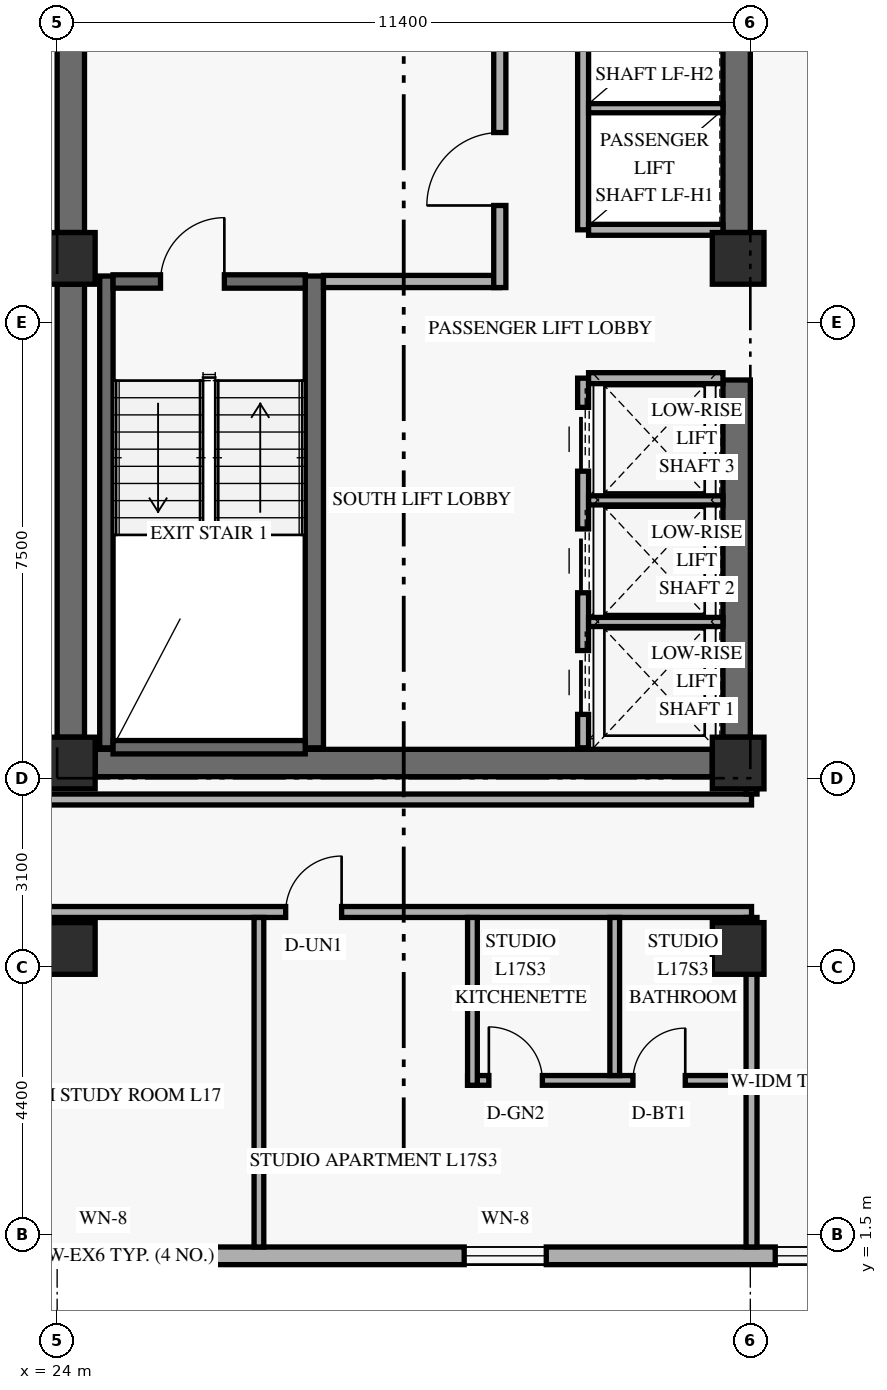
"""IFC4 building model, lengths in metres.
Left out: names, types, materials, properties, quantities, classifications, styles, units other than length and angle.
Written with IfcOpenShell. Run it as: python <this file> out.ifc"""

import sys

from ifc_helpers import new_model, si_unit, direction, frame, frame_2d, origin, origin_2d, place, context, subcontext, project, spatial, rectangle, extrude, element, fill, save


model = new_model("IFC4")
c1 = context("Model", 3, precision=1e-05, world=origin(), true_north=direction((0.0, 1.0)))
c2 = subcontext(c1, "Body", "Model", "MODEL_VIEW")
j1 = project(units=[si_unit("LENGTHUNIT", "METRE"), si_unit("PLANEANGLEUNIT", "RADIAN")], contexts=[c1])
p1 = place(None, origin())
s1 = spatial("IfcSite", under=j1, at=p1, CompositionType="ELEMENT")
p2 = place(p1, origin())
s2 = spatial("IfcBuilding", under=s1, at=p2, CompositionType="ELEMENT")
p3 = place(p2, frame((0.0, 0.0, 67.8)))
s3 = spatial("IfcBuildingStorey", under=s2, at=p3, CompositionType="ELEMENT", Elevation=67.8)
p4 = place(p3, frame((24.225, 9.675, 0.0), z_axis=(0.0, 0.0, 1.0), x_axis=(0.0, 1.0, 0.0)))
e1 = element("IfcWall", 1, at=p4, inside=s3, PredefinedType="SHEAR", context=c2, shape_type="SweptSolid", body=[
    extrude(rectangle(XDim=7.45, YDim=0.45, at=frame_2d((3.725, 0.0))), origin(), (0.0, 0.0, 1.0), 2.607),
])
p5 = place(p3, frame((24.225, 17.975, 0.0), z_axis=(0.0, 0.0, 1.0), x_axis=(0.0, 1.0, 0.0)))
e2 = element("IfcWall", 2, at=p5, inside=s3, PredefinedType="SHEAR", context=c2, shape_type="SweptSolid", body=[
    extrude(rectangle(XDim=11.8, YDim=0.45, at=frame_2d((5.9, 0.0))), origin(), (0.0, 0.0, 1.0), 2.607),
])
p6 = place(p3, frame((35.175, 9.675, 0.0), z_axis=(0.0, 0.0, 1.0), x_axis=(0.0, 1.0, 0.0)))
e3 = element("IfcWall", 3, at=p6, inside=s3, PredefinedType="SHEAR", context=c2, shape_type="SweptSolid", body=[
    extrude(rectangle(XDim=5.875, YDim=0.45, at=frame_2d((2.938, 0.0))), origin(), (0.0, 0.0, 1.0), 2.607),
])
p7 = place(p3, frame((35.175, 17.975, 0.0), z_axis=(0.0, 0.0, 1.0), x_axis=(0.0, 1.0, 0.0)))
e4 = element("IfcWall", 4, at=p7, inside=s3, PredefinedType="SHEAR", context=c2, shape_type="SweptSolid", body=[
    extrude(rectangle(XDim=10.125, YDim=0.45, at=frame_2d((5.062, 0.0))), origin(), (0.0, 0.0, 1.0), 2.607),
])
p8 = place(p3, frame((24.625, 9.25, 0.0), z_axis=(0.0, 0.0, 1.0), x_axis=(1.0, 0.0, 0.0)))
e5 = element("IfcWall", 5, at=p8, inside=s3, PredefinedType="SHEAR", context=c2, shape_type="SweptSolid", body=[
    extrude(rectangle(XDim=10.15, YDim=0.45, at=frame_2d((5.075, 0.0))), origin(), (0.0, 0.0, 1.0), 3.3),
])
p9 = place(p3, frame((24.81, 9.5, 0.0), z_axis=(0.0, 0.0, 1.0), x_axis=(0.0, 1.0, 0.0)))
e6 = element("IfcWall", 6, at=p9, inside=s3, PredefinedType="SHEAR", context=c2, shape_type="SweptSolid", body=[
    extrude(rectangle(XDim=7.76, YDim=0.22, at=frame_2d((3.88, 0.0))), origin(), (0.0, 0.0, 1.0), 3.3),
])
p10 = place(p3, frame((28.23, 9.5, 0.0), z_axis=(0.0, 0.0, 1.0), x_axis=(0.0, 1.0, 0.0)))
e7 = element("IfcWall", 7, at=p10, inside=s3, PredefinedType="SHEAR", context=c2, shape_type="SweptSolid", body=[
    extrude(rectangle(XDim=7.76, YDim=0.3, at=frame_2d((3.88, 0.0))), origin(), (0.0, 0.0, 1.0), 3.3),
])
p11 = place(p3, frame((24.92, 9.51, 0.0), z_axis=(0.0, 0.0, 1.0), x_axis=(1.0, 0.0, 0.0)))
e8 = element("IfcWall", 8, at=p11, inside=s3, PredefinedType="SHEAR", context=c2, shape_type="SweptSolid", body=[
    extrude(rectangle(XDim=3.16, YDim=0.22, at=frame_2d((1.58, 0.0))), origin(), (0.0, 0.0, 1.0), 3.3),
])
p12 = place(p3, frame((24.92, 17.17, 0.0), z_axis=(0.0, 0.0, 1.0), x_axis=(1.0, 0.0, 0.0)))
e9 = element("IfcWall", 9, at=p12, inside=s3, PredefinedType="SHEAR", context=c2, shape_type="SweptSolid", body=[
    extrude(rectangle(XDim=3.16, YDim=0.22, at=frame_2d((1.58, 0.0))), origin(), (0.0, 0.0, 1.0), 3.3),
])
p13 = place(p12, frame((0.78, 0.0, 0.0)))
e10 = element("IfcOpeningElement", 10, at=p13, cuts=e9, PredefinedType="OPENING", context=c2, shape_type="SweptSolid", body=[
    extrude(rectangle(XDim=1.05, YDim=2.15, at=frame_2d((0.525, 1.075))), frame((0.0, 0.12, 0.0), z_axis=(0.0, -1.0, 0.0), x_axis=(1.0, 0.0, 0.0)), (0.0, 0.0, 1.0), 0.24),
])
for number, where, z_axis, x_axis in (
    (11, (24.2, 6.2, 0.0), (0.0, 0.0, 1.0), (1.0, 0.0, 0.0)),
    (12, (24.2, 9.25, 0.0), (0.0, 0.0, 1.0), (1.0, 0.0, 0.0)),
    (13, (24.2, 17.55, 0.0), (0.0, 0.0, 1.0), (1.0, 0.0, 0.0)),
    (14, (35.2, 6.2, 0.0), (0.0, 0.0, 1.0), (1.0, 0.0, 0.0)),
    (15, (35.2, 9.25, 0.0), (0.0, 0.0, 1.0), (1.0, 0.0, 0.0)),
    (16, (35.2, 17.55, 0.0), (0.0, 0.0, 1.0), (1.0, 0.0, 0.0)),
):
    element("IfcColumn", number, at=place(p3, frame(where, z_axis=z_axis, x_axis=x_axis)), inside=s3, PredefinedType="COLUMN", context=c2, shape_type="SweptSolid", body=[
        extrude(rectangle(XDim=0.85, YDim=0.85, at=origin_2d()), origin(), (0.0, 0.0, 1.0), 3.6),
    ])
p14 = place(p3, frame((5.42, 1.145, 0.0), z_axis=(0.0, 0.0, 1.0), x_axis=(1.0, 0.0, 0.0)))
e17 = element("IfcWall", 17, at=p14, inside=s3, PredefinedType="SOLIDWALL", context=c2, shape_type="SweptSolid", body=[
    extrude(rectangle(XDim=39.56, YDim=0.29, at=frame_2d((19.78, 0.0))), origin(), (0.0, 0.0, 1.0), 3.3),
])
p15 = place(p14, frame((2.765, 0.0, 0.85)))
e18 = element("IfcOpeningElement", 18, at=p15, cuts=e17, PredefinedType="OPENING", context=c2, shape_type="SweptSolid", body=[
    extrude(rectangle(XDim=1.35, YDim=1.55, at=frame_2d((0.675, 0.775))), frame((0.0, 0.155, 0.0), z_axis=(0.0, -1.0, 0.0), x_axis=(1.0, 0.0, 0.0)), (0.0, 0.0, 1.0), 0.31),
])
p16 = place(p14, frame((7.18, 0.0, 0.85)))
e19 = element("IfcOpeningElement", 19, at=p16, cuts=e17, PredefinedType="OPENING", context=c2, shape_type="SweptSolid", body=[
    extrude(rectangle(XDim=1.2, YDim=1.5, at=frame_2d((0.6, 0.75))), frame((0.0, 0.155, 0.0), z_axis=(0.0, -1.0, 0.0), x_axis=(1.0, 0.0, 0.0)), (0.0, 0.0, 1.0), 0.31),
])
p17 = place(p14, frame((12.056, 0.0, 0.85)))
e20 = element("IfcOpeningElement", 20, at=p17, cuts=e17, PredefinedType="OPENING", context=c2, shape_type="SweptSolid", body=[
    extrude(rectangle(XDim=1.35, YDim=1.55, at=frame_2d((0.675, 0.775))), frame((0.0, 0.155, 0.0), z_axis=(0.0, -1.0, 0.0), x_axis=(1.0, 0.0, 0.0)), (0.0, 0.0, 1.0), 0.31),
])
p18 = place(p14, frame((18.665, 0.0, 0.85)))
e21 = element("IfcOpeningElement", 21, at=p18, cuts=e17, PredefinedType="OPENING", context=c2, shape_type="SweptSolid", body=[
    extrude(rectangle(XDim=1.35, YDim=1.55, at=frame_2d((0.675, 0.775))), frame((0.0, 0.155, 0.0), z_axis=(0.0, -1.0, 0.0), x_axis=(1.0, 0.0, 0.0)), (0.0, 0.0, 1.0), 0.31),
])
p19 = place(p14, frame((25.274, 0.0, 0.85)))
e22 = element("IfcOpeningElement", 22, at=p19, cuts=e17, PredefinedType="OPENING", context=c2, shape_type="SweptSolid", body=[
    extrude(rectangle(XDim=1.35, YDim=1.55, at=frame_2d((0.675, 0.775))), frame((0.0, 0.155, 0.0), z_axis=(0.0, -1.0, 0.0), x_axis=(1.0, 0.0, 0.0)), (0.0, 0.0, 1.0), 0.31),
])
p20 = place(p14, frame((30.39, 0.0, 0.85)))
e23 = element("IfcOpeningElement", 23, at=p20, cuts=e17, PredefinedType="OPENING", context=c2, shape_type="SweptSolid", body=[
    extrude(rectangle(XDim=1.35, YDim=1.55, at=frame_2d((0.675, 0.775))), frame((0.0, 0.155, 0.0), z_axis=(0.0, -1.0, 0.0), x_axis=(1.0, 0.0, 0.0)), (0.0, 0.0, 1.0), 0.31),
])
p21 = place(p14, frame((35.17, 0.0, 0.85)))
e24 = element("IfcOpeningElement", 24, at=p21, cuts=e17, PredefinedType="OPENING", context=c2, shape_type="SweptSolid", body=[
    extrude(rectangle(XDim=1.35, YDim=1.55, at=frame_2d((0.675, 0.775))), frame((0.0, 0.155, 0.0), z_axis=(0.0, -1.0, 0.0), x_axis=(1.0, 0.0, 0.0)), (0.0, 0.0, 1.0), 0.31),
])
p22 = place(p3, frame((28.38, 17.17, 0.0), z_axis=(0.0, 0.0, 1.0), x_axis=(1.0, 0.0, 0.0)))
e25 = element("IfcWall", 25, at=p22, inside=s3, PredefinedType="STANDARD", context=c2, shape_type="SweptSolid", body=[
    extrude(rectangle(XDim=2.9, YDim=0.2, at=frame_2d((1.45, 0.0))), origin(), (0.0, 0.0, 1.0), 3.3),
])
p23 = place(p3, frame((31.28, 17.07, 0.0), z_axis=(0.0, 0.0, 1.0), x_axis=(0.0, 1.0, 0.0)))
e26 = element("IfcWall", 26, at=p23, inside=s3, PredefinedType="STANDARD", context=c2, shape_type="SweptSolid", body=[
    extrude(rectangle(XDim=3.92, YDim=0.2, at=frame_2d((1.96, 0.0))), origin(), (0.0, 0.0, 1.0), 2.589),
])
p24 = place(p23, frame((1.35, 0.0, 0.0)))
e27 = element("IfcOpeningElement", 27, at=p24, cuts=e26, PredefinedType="OPENING", context=c2, shape_type="SweptSolid", body=[
    extrude(rectangle(XDim=1.2, YDim=2.15, at=frame_2d((0.6, 1.075))), frame((0.0, 0.11, 0.0), z_axis=(0.0, -1.0, 0.0), x_axis=(1.0, 0.0, 0.0)), (0.0, 0.0, 1.0), 0.22),
])
p25 = place(p3, frame((32.65, 9.5, 0.0), z_axis=(0.0, 0.0, 1.0), x_axis=(0.0, 1.0, 0.0)))
e28 = element("IfcWall", 28, at=p25, inside=s3, PredefinedType="STANDARD", context=c2, shape_type="SweptSolid", body=[
    extrude(rectangle(XDim=6.08, YDim=0.18, at=frame_2d((3.04, 0.0))), origin(), (0.0, 0.0, 1.0), 3.3),
])
p26 = place(p25, frame((0.55, 0.0, 0.0)))
e29 = element("IfcOpeningElement", 29, at=p26, cuts=e28, PredefinedType="OPENING", context=c2, shape_type="SweptSolid", body=[
    extrude(rectangle(XDim=1.05, YDim=2.2, at=frame_2d((0.525, 1.1))), frame((0.0, 0.1, 0.0), z_axis=(0.0, -1.0, 0.0), x_axis=(1.0, 0.0, 0.0)), (0.0, 0.0, 1.0), 0.2),
])
p27 = place(p25, frame((2.55, 0.0, 0.0)))
e30 = element("IfcOpeningElement", 30, at=p27, cuts=e28, PredefinedType="OPENING", context=c2, shape_type="SweptSolid", body=[
    extrude(rectangle(XDim=1.05, YDim=2.2, at=frame_2d((0.525, 1.1))), frame((0.0, 0.1, 0.0), z_axis=(0.0, -1.0, 0.0), x_axis=(1.0, 0.0, 0.0)), (0.0, 0.0, 1.0), 0.2),
])
p28 = place(p25, frame((4.55, 0.0, 0.0)))
e31 = element("IfcOpeningElement", 31, at=p28, cuts=e28, PredefinedType="OPENING", context=c2, shape_type="SweptSolid", body=[
    extrude(rectangle(XDim=1.05, YDim=2.2, at=frame_2d((0.525, 1.1))), frame((0.0, 0.1, 0.0), z_axis=(0.0, -1.0, 0.0), x_axis=(1.0, 0.0, 0.0)), (0.0, 0.0, 1.0), 0.2),
])
p29 = place(p3, frame((32.74, 15.58, 0.0), z_axis=(0.0, 0.0, 1.0), x_axis=(1.0, 0.0, 0.0)))
e32 = element("IfcWall", 32, at=p29, inside=s3, PredefinedType="STANDARD", context=c2, shape_type="SweptSolid", body=[
    extrude(rectangle(XDim=2.21, YDim=0.18, at=frame_2d((1.105, 0.0))), origin(), (0.0, 0.0, 1.0), 3.3),
])
for number, where, z_axis, x_axis in (
    (33, (32.74, 11.57, 0.0), (0.0, 0.0, 1.0), (1.0, 0.0, 0.0)),
    (34, (32.74, 13.57, 0.0), (0.0, 0.0, 1.0), (1.0, 0.0, 0.0)),
):
    element("IfcWall", number, at=place(p3, frame(where, z_axis=z_axis, x_axis=x_axis)), inside=s3, PredefinedType="STANDARD", context=c2, shape_type="SweptSolid", body=[
        extrude(rectangle(XDim=2.21, YDim=0.15, at=frame_2d((1.105, 0.0))), origin(), (0.0, 0.0, 1.0), 3.3),
    ])
p30 = place(p3, frame((32.65, 18.02, 0.0), z_axis=(0.0, 0.0, 1.0), x_axis=(0.0, 1.0, 0.0)))
e35 = element("IfcWall", 35, at=p30, inside=s3, PredefinedType="STANDARD", context=c2, shape_type="SweptSolid", body=[
    extrude(rectangle(XDim=10.06, YDim=0.18, at=frame_2d((5.03, 0.0))), origin(), (0.0, 0.0, 1.0), 3.3),
])
p31 = place(p3, frame((32.74, 18.02, 0.0), z_axis=(0.0, 0.0, 1.0), x_axis=(1.0, 0.0, 0.0)))
e36 = element("IfcWall", 36, at=p31, inside=s3, PredefinedType="STANDARD", context=c2, shape_type="SweptSolid", body=[
    extrude(rectangle(XDim=2.21, YDim=0.18, at=frame_2d((1.105, 0.0))), origin(), (0.0, 0.0, 1.0), 3.3),
])
p32 = place(p3, frame((32.74, 20.02, 0.0), z_axis=(0.0, 0.0, 1.0), x_axis=(1.0, 0.0, 0.0)))
e37 = element("IfcWall", 37, at=p32, inside=s3, PredefinedType="STANDARD", context=c2, shape_type="SweptSolid", body=[
    extrude(rectangle(XDim=2.21, YDim=0.15, at=frame_2d((1.105, 0.0))), origin(), (0.0, 0.0, 1.0), 3.3),
])
p33 = place(p3, frame((14.1, 6.8, 0.0), z_axis=(0.0, 0.0, 1.0), x_axis=(1.0, 0.0, 0.0)))
e38 = element("IfcWall", 38, at=p33, inside=s3, PredefinedType="STANDARD", context=c2, shape_type="SweptSolid", body=[
    extrude(rectangle(XDim=21.32, YDim=0.18, at=frame_2d((10.66, 0.0))), origin(), (0.0, 0.0, 1.0), 2.589),
])
p34 = place(p33, frame((0.44, 0.0, 0.0)))
e39 = element("IfcOpeningElement", 39, at=p34, cuts=e38, PredefinedType="OPENING", context=c2, shape_type="SweptSolid", body=[
    extrude(rectangle(XDim=0.92, YDim=2.15, at=frame_2d((0.46, 1.075))), frame((0.0, 0.1, 0.0), z_axis=(0.0, -1.0, 0.0), x_axis=(1.0, 0.0, 0.0)), (0.0, 0.0, 1.0), 0.2),
])
p35 = place(p33, frame((8.582, 0.0, 0.0)))
e40 = element("IfcOpeningElement", 40, at=p35, cuts=e38, PredefinedType="OPENING", context=c2, shape_type="SweptSolid", body=[
    extrude(rectangle(XDim=0.95, YDim=2.15, at=frame_2d((0.475, 1.075))), frame((0.0, 0.1, 0.0), z_axis=(0.0, -1.0, 0.0), x_axis=(1.0, 0.0, 0.0)), (0.0, 0.0, 1.0), 0.2),
])
p36 = place(p33, frame((13.658, 0.0, 0.0)))
e41 = element("IfcOpeningElement", 41, at=p36, cuts=e38, PredefinedType="OPENING", context=c2, shape_type="SweptSolid", body=[
    extrude(rectangle(XDim=0.92, YDim=2.15, at=frame_2d((0.46, 1.075))), frame((0.0, 0.1, 0.0), z_axis=(0.0, -1.0, 0.0), x_axis=(1.0, 0.0, 0.0)), (0.0, 0.0, 1.0), 0.2),
])
p37 = place(p3, frame((23.75, 8.65, 0.0), z_axis=(0.0, 0.0, 1.0), x_axis=(1.0, 0.0, 0.0)))
e42 = element("IfcWall", 42, at=p37, inside=s3, PredefinedType="STANDARD", context=c2, shape_type="SweptSolid", body=[
    extrude(rectangle(XDim=11.67, YDim=0.18, at=frame_2d((5.835, 0.0))), origin(), (0.0, 0.0, 1.0), 2.589),
])
p38 = place(p3, frame((35.42, 1.29, 0.0), z_axis=(0.0, 0.0, 1.0), x_axis=(0.0, 1.0, 0.0)))
e43 = element("IfcWall", 43, at=p38, inside=s3, PredefinedType="PARTITIONING", context=c2, shape_type="SweptSolid", body=[
    extrude(rectangle(XDim=5.42, YDim=0.18, at=frame_2d((2.71, 0.0))), origin(), (0.0, 0.0, 1.0), 3.3),
])
p39 = place(p3, frame((35.42, 8.74, 0.0), z_axis=(0.0, 0.0, 1.0), x_axis=(0.0, 1.0, 0.0)))
e44 = element("IfcWall", 44, at=p39, inside=s3, PredefinedType="STANDARD", context=c2, shape_type="SweptSolid", body=[
    extrude(rectangle(XDim=0.51, YDim=0.18, at=frame_2d((0.255, 0.0))), origin(), (0.0, 0.0, 1.0), 3.3),
])
p40 = place(p3, frame((27.318, 1.29, 0.0), z_axis=(0.0, 0.0, 1.0), x_axis=(0.0, 1.0, 0.0)))
e45 = element("IfcWall", 45, at=p40, inside=s3, PredefinedType="PARTITIONING", context=c2, shape_type="SweptSolid", body=[
    extrude(rectangle(XDim=5.42, YDim=0.16, at=frame_2d((2.71, 0.0))), origin(), (0.0, 0.0, 1.0), 2.749),
])
p41 = place(p3, frame((30.75, 4.03, 0.0), z_axis=(0.0, 0.0, 1.0), x_axis=(1.0, 0.0, 0.0)))
e46 = element("IfcWall", 46, at=p41, inside=s3, PredefinedType="PLUMBINGWALL", context=c2, shape_type="SweptSolid", body=[
    extrude(rectangle(XDim=4.58, YDim=0.16, at=frame_2d((2.29, 0.0))), origin(), (0.0, 0.0, 1.0), 3.3),
])
p42 = place(p41, frame((0.35, 0.0, 0.0)))
e47 = element("IfcOpeningElement", 47, at=p42, cuts=e46, PredefinedType="OPENING", context=c2, shape_type="SweptSolid", body=[
    extrude(rectangle(XDim=0.88, YDim=2.12, at=frame_2d((0.44, 1.06))), frame((0.0, 0.09, 0.0), z_axis=(0.0, -1.0, 0.0), x_axis=(1.0, 0.0, 0.0)), (0.0, 0.0, 1.0), 0.18),
])
p43 = place(p41, frame((2.72, 0.0, 0.0)))
e48 = element("IfcOpeningElement", 48, at=p43, cuts=e46, PredefinedType="OPENING", context=c2, shape_type="SweptSolid", body=[
    extrude(rectangle(XDim=0.86, YDim=2.12, at=frame_2d((0.43, 1.06))), frame((0.0, 0.09, 0.0), z_axis=(0.0, -1.0, 0.0), x_axis=(1.0, 0.0, 0.0)), (0.0, 0.0, 1.0), 0.18),
])
p44 = place(p3, frame((30.83, 3.95, 0.0), z_axis=(0.0, 0.0, 1.0), x_axis=(0.0, 1.0, 0.0)))
e49 = element("IfcWall", 49, at=p44, inside=s3, PredefinedType="PLUMBINGWALL", context=c2, shape_type="SweptSolid", body=[
    extrude(rectangle(XDim=2.76, YDim=0.16, at=frame_2d((1.38, 0.0))), origin(), (0.0, 0.0, 1.0), 2.749),
])
p45 = place(p3, frame((33.17, 4.11, 0.0), z_axis=(0.0, 0.0, 1.0), x_axis=(0.0, 1.0, 0.0)))
e50 = element("IfcWall", 50, at=p45, inside=s3, PredefinedType="PLUMBINGWALL", context=c2, shape_type="SweptSolid", body=[
    extrude(rectangle(XDim=2.6, YDim=0.16, at=frame_2d((1.3, 0.0))), origin(), (0.0, 0.0, 1.0), 2.749),
])
p46 = place(p18, origin())
e51 = element("IfcWindow", 51, at=p46, inside=s3, PartitioningType="SINGLE_PANEL", PredefinedType="WINDOW", context=c2, shape_type="SweptSolid", body=[
    extrude(rectangle(XDim=1.35, YDim=1.55, at=frame_2d((0.675, 0.775))), frame((0.0, 0.03, 0.0), z_axis=(0.0, -1.0, 0.0), x_axis=(1.0, 0.0, 0.0)), (0.0, 0.0, 1.0), 0.06),
])
fill(e21, e51)
p47 = place(p19, origin())
e52 = element("IfcWindow", 52, at=p47, inside=s3, PartitioningType="SINGLE_PANEL", PredefinedType="WINDOW", context=c2, shape_type="SweptSolid", body=[
    extrude(rectangle(XDim=1.35, YDim=1.55, at=frame_2d((0.675, 0.775))), frame((0.0, 0.03, 0.0), z_axis=(0.0, -1.0, 0.0), x_axis=(1.0, 0.0, 0.0)), (0.0, 0.0, 1.0), 0.06),
])
fill(e22, e52)
p48 = place(p20, origin())
e53 = element("IfcWindow", 53, at=p48, inside=s3, PartitioningType="SINGLE_PANEL", PredefinedType="WINDOW", context=c2, shape_type="SweptSolid", body=[
    extrude(rectangle(XDim=1.35, YDim=1.55, at=frame_2d((0.675, 0.775))), frame((0.0, 0.03, 0.0), z_axis=(0.0, -1.0, 0.0), x_axis=(1.0, 0.0, 0.0)), (0.0, 0.0, 1.0), 0.06),
])
fill(e23, e53)
p49 = place(p13, frame((1.05, 0.0, 0.0), z_axis=(0.0, 0.0, 1.0), x_axis=(-1.0, 0.0, 0.0)))
e54 = element("IfcDoor", 54, at=p49, inside=s3, OperationType="SINGLE_SWING_LEFT", PredefinedType="DOOR", context=c2, shape_type="SweptSolid", body=[
    extrude(rectangle(XDim=1.05, YDim=2.15, at=frame_2d((0.525, 1.075))), frame((0.0, 0.025, 0.0), z_axis=(0.0, -1.0, 0.0), x_axis=(1.0, 0.0, 0.0)), (0.0, 0.0, 1.0), 0.05),
])
fill(e10, e54)
p50 = place(p24, origin())
e55 = element("IfcDoor", 55, at=p50, inside=s3, OperationType="SINGLE_SWING_LEFT", PredefinedType="DOOR", context=c2, shape_type="SweptSolid", body=[
    extrude(rectangle(XDim=1.2, YDim=2.15, at=frame_2d((0.6, 1.075))), frame((0.0, 0.025, 0.0), z_axis=(0.0, -1.0, 0.0), x_axis=(1.0, 0.0, 0.0)), (0.0, 0.0, 1.0), 0.05),
])
fill(e27, e55)
p51 = place(p26, origin())
e56 = element("IfcDoor", 56, at=p51, inside=s3, OperationType="SLIDING_TO_LEFT", PredefinedType="DOOR", context=c2, shape_type="SweptSolid", body=[
    extrude(rectangle(XDim=1.05, YDim=2.2, at=frame_2d((0.525, 1.1))), frame((0.0, 0.025, 0.0), z_axis=(0.0, -1.0, 0.0), x_axis=(1.0, 0.0, 0.0)), (0.0, 0.0, 1.0), 0.05),
])
fill(e29, e56)
p52 = place(p27, origin())
e57 = element("IfcDoor", 57, at=p52, inside=s3, OperationType="SLIDING_TO_LEFT", PredefinedType="DOOR", context=c2, shape_type="SweptSolid", body=[
    extrude(rectangle(XDim=1.05, YDim=2.2, at=frame_2d((0.525, 1.1))), frame((0.0, 0.025, 0.0), z_axis=(0.0, -1.0, 0.0), x_axis=(1.0, 0.0, 0.0)), (0.0, 0.0, 1.0), 0.05),
])
fill(e30, e57)
p53 = place(p28, origin())
e58 = element("IfcDoor", 58, at=p53, inside=s3, OperationType="SLIDING_TO_LEFT", PredefinedType="DOOR", context=c2, shape_type="SweptSolid", body=[
    extrude(rectangle(XDim=1.05, YDim=2.2, at=frame_2d((0.525, 1.1))), frame((0.0, 0.025, 0.0), z_axis=(0.0, -1.0, 0.0), x_axis=(1.0, 0.0, 0.0)), (0.0, 0.0, 1.0), 0.05),
])
fill(e31, e58)
p54 = place(p36, origin())
e59 = element("IfcDoor", 59, at=p54, inside=s3, OperationType="SINGLE_SWING_RIGHT", PredefinedType="DOOR", context=c2, shape_type="SweptSolid", body=[
    extrude(rectangle(XDim=0.92, YDim=2.15, at=frame_2d((0.46, 1.075))), frame((0.0, 0.025, 0.0), z_axis=(0.0, -1.0, 0.0), x_axis=(1.0, 0.0, 0.0)), (0.0, 0.0, 1.0), 0.05),
])
fill(e41, e59)
p55 = place(p42, origin())
e60 = element("IfcDoor", 60, at=p55, inside=s3, OperationType="SINGLE_SWING_LEFT", PredefinedType="DOOR", context=c2, shape_type="SweptSolid", body=[
    extrude(rectangle(XDim=0.88, YDim=2.12, at=frame_2d((0.44, 1.06))), frame((0.0, 0.025, 0.0), z_axis=(0.0, -1.0, 0.0), x_axis=(1.0, 0.0, 0.0)), (0.0, 0.0, 1.0), 0.05),
])
fill(e47, e60)
p56 = place(p43, origin())
e61 = element("IfcDoor", 61, at=p56, inside=s3, OperationType="SINGLE_SWING_RIGHT", PredefinedType="DOOR", context=c2, shape_type="SweptSolid", body=[
    extrude(rectangle(XDim=0.86, YDim=2.12, at=frame_2d((0.43, 1.06))), frame((0.0, 0.025, 0.0), z_axis=(0.0, -1.0, 0.0), x_axis=(1.0, 0.0, 0.0)), (0.0, 0.0, 1.0), 0.05),
])
fill(e48, e61)
save(model, sys.argv[1])
